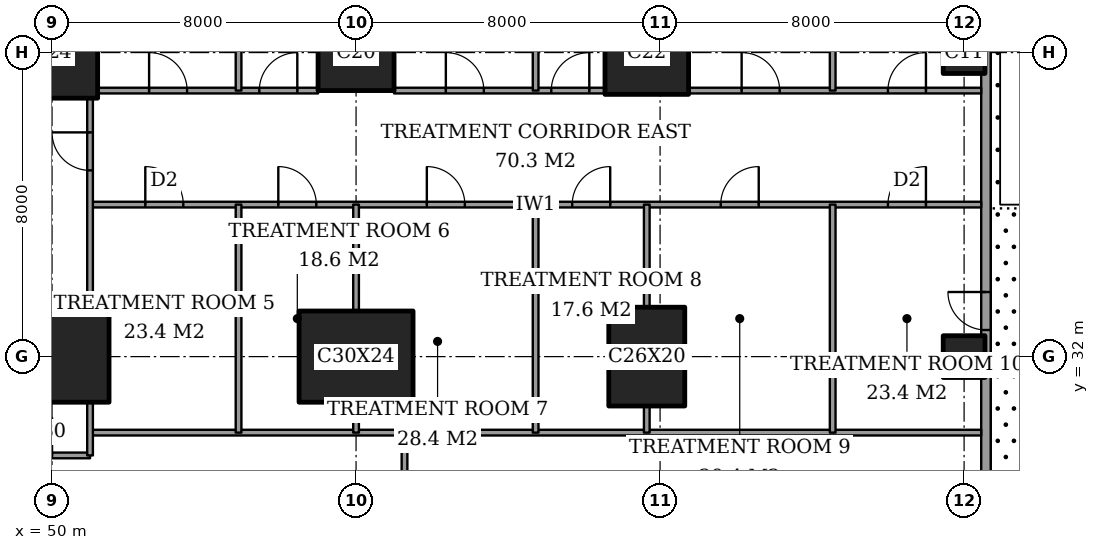
"""IFC4 building model, lengths in metres.
Left out: names, types, materials, properties, quantities, classifications, styles, units other than length and angle.
Written with IfcOpenShell. Run it as: python <this file> out.ifc"""

import sys

from ifc_helpers import new_model, si_unit, direction, frame, frame_2d, origin, origin_2d, place, context, subcontext, project, spatial, rectangle, extrude, element, fill, save


model = new_model("IFC4")
c1 = context("Model", 3, precision=1e-05, world=origin(), true_north=direction((0.0, 1.0)))
c2 = subcontext(c1, "Body", "Model", "MODEL_VIEW")
j1 = project(units=[si_unit("LENGTHUNIT", "METRE"), si_unit("PLANEANGLEUNIT", "RADIAN")], contexts=[c1])
p1 = place(None, origin())
s1 = spatial("IfcSite", under=j1, at=p1, CompositionType="ELEMENT")
p2 = place(p1, origin())
s2 = spatial("IfcBuilding", under=s1, at=p2, CompositionType="ELEMENT")
p3 = place(p2, frame((0.0, 0.0, 11.0)))
s3 = spatial("IfcBuildingStorey", under=s2, at=p3, CompositionType="ELEMENT", Elevation=11.0)
p4 = place(p3, frame((50.0, 32.0, 0.0), z_axis=(0.0, 0.0, 1.0), x_axis=(1.0, 0.0, 0.0)))
e1 = element("IfcColumn", 1, at=p4, inside=s3, PredefinedType="COLUMN", context=c2, shape_type="SweptSolid", body=[
    extrude(rectangle(XDim=3.0, YDim=2.4, at=origin_2d()), origin(), (0.0, 0.0, 1.0), 5.0),
])
p5 = place(p3, frame((50.0, 40.0, 0.0), z_axis=(0.0, 0.0, 1.0), x_axis=(1.0, 0.0, 0.0)))
e2 = element("IfcColumn", 2, at=p5, inside=s3, PredefinedType="COLUMN", context=c2, shape_type="SweptSolid", body=[
    extrude(rectangle(XDim=2.4, YDim=2.4, at=origin_2d()), origin(), (0.0, 0.0, 1.0), 5.0),
])
p6 = place(p3, frame((58.0, 32.0, 0.0), z_axis=(0.0, 0.0, 1.0), x_axis=(1.0, 0.0, 0.0)))
e3 = element("IfcColumn", 3, at=p6, inside=s3, PredefinedType="COLUMN", context=c2, shape_type="SweptSolid", body=[
    extrude(rectangle(XDim=3.0, YDim=2.4, at=origin_2d()), origin(), (0.0, 0.0, 1.0), 5.0),
])
p7 = place(p3, frame((58.0, 40.0, 0.0), z_axis=(0.0, 0.0, 1.0), x_axis=(1.0, 0.0, 0.0)))
e4 = element("IfcColumn", 4, at=p7, inside=s3, PredefinedType="COLUMN", context=c2, shape_type="SweptSolid", body=[
    extrude(rectangle(XDim=2.0, YDim=2.0, at=origin_2d()), origin(), (0.0, 0.0, 1.0), 5.0),
])
p8 = place(p3, frame((65.65, 32.0, 0.0), z_axis=(0.0, 0.0, 1.0), x_axis=(0.0, 1.0, 0.0)))
e5 = element("IfcColumn", 5, at=p8, inside=s3, PredefinedType="COLUMN", context=c2, shape_type="SweptSolid", body=[
    extrude(rectangle(XDim=2.6, YDim=2.0, at=origin_2d()), origin(), (0.0, 0.0, 1.0), 5.0),
])
p9 = place(p3, frame((65.65, 40.0, 0.0), z_axis=(0.0, 0.0, 1.0), x_axis=(1.0, 0.0, 0.0)))
e6 = element("IfcColumn", 6, at=p9, inside=s3, PredefinedType="COLUMN", context=c2, shape_type="SweptSolid", body=[
    extrude(rectangle(XDim=2.2, YDim=2.2, at=origin_2d()), origin(), (0.0, 0.0, 1.0), 5.0),
])
for number, where, z_axis, x_axis in (
    (7, (74.0, 32.0, 0.0), (0.0, 0.0, 1.0), (1.0, 0.0, 0.0)),
    (8, (74.0, 40.0, 0.0), (0.0, 0.0, 1.0), (1.0, 0.0, 0.0)),
):
    element("IfcColumn", number, at=place(p3, frame(where, z_axis=z_axis, x_axis=x_axis)), inside=s3, PredefinedType="COLUMN", context=c2, shape_type="SweptSolid", body=[
        extrude(rectangle(XDim=1.1, YDim=1.1, at=origin_2d()), origin(), (0.0, 0.0, 1.0), 5.0),
    ])
p10 = place(p3, frame((74.575, -8.575, 0.0), z_axis=(0.0, 0.0, 1.0), x_axis=(0.0, 1.0, 0.0)))
e9 = element("IfcWall", 9, at=p10, inside=s3, PredefinedType="SOLIDWALL", context=c2, shape_type="SweptSolid", body=[
    extrude(rectangle(XDim=65.15, YDim=0.25, at=frame_2d((32.575, 0.0))), origin(), (0.0, 0.0, 1.0), 5.0),
])
p11 = place(p10, frame((12.075, 0.0, 0.0)))
e10 = element("IfcOpeningElement", 10, at=p11, cuts=e9, PredefinedType="OPENING", context=c2, shape_type="SweptSolid", body=[
    extrude(rectangle(XDim=1.0, YDim=2.4, at=frame_2d((0.5, 1.2))), frame((0.0, 0.135, 0.0), z_axis=(0.0, -1.0, 0.0), x_axis=(1.0, 0.0, 0.0)), (0.0, 0.0, 1.0), 0.27),
])
p12 = place(p10, frame((28.075, 0.0, 0.0)))
e11 = element("IfcOpeningElement", 11, at=p12, cuts=e9, PredefinedType="OPENING", context=c2, shape_type="SweptSolid", body=[
    extrude(rectangle(XDim=1.0, YDim=2.4, at=frame_2d((0.5, 1.2))), frame((0.0, 0.135, 0.0), z_axis=(0.0, -1.0, 0.0), x_axis=(1.0, 0.0, 0.0)), (0.0, 0.0, 1.0), 0.27),
])
p13 = place(p10, frame((41.275, 0.0, 0.0)))
e12 = element("IfcOpeningElement", 12, at=p13, cuts=e9, PredefinedType="OPENING", context=c2, shape_type="SweptSolid", body=[
    extrude(rectangle(XDim=1.0, YDim=2.4, at=frame_2d((0.5, 1.2))), frame((0.0, 0.135, 0.0), z_axis=(0.0, -1.0, 0.0), x_axis=(1.0, 0.0, 0.0)), (0.0, 0.0, 1.0), 0.27),
])
p14 = place(p3, frame((48.0, 29.4, 0.0), z_axis=(0.0, 0.0, 1.0), x_axis=(1.0, 0.0, 0.0)))
e13 = element("IfcWall", 13, at=p14, inside=s3, PredefinedType="PARTITIONING", context=c2, shape_type="SweptSolid", body=[
    extrude(rectangle(XDim=3.0, YDim=0.15, at=frame_2d((1.5, 0.0))), origin(), (0.0, 0.0, 1.0), 4.7),
])
p15 = place(p14, frame((1.0, 0.0, 0.0)))
e14 = element("IfcOpeningElement", 14, at=p15, cuts=e13, PredefinedType="OPENING", context=c2, shape_type="SweptSolid", body=[
    extrude(rectangle(XDim=1.0, YDim=2.1, at=frame_2d((0.5, 1.05))), frame((0.0, 0.085, 0.0), z_axis=(0.0, -1.0, 0.0), x_axis=(1.0, 0.0, 0.0)), (0.0, 0.0, 1.0), 0.17),
])
p16 = place(p3, frame((51.0, 30.0, 0.0), z_axis=(0.0, 0.0, 1.0), x_axis=(1.0, 0.0, 0.0)))
e15 = element("IfcWall", 15, at=p16, inside=s3, PredefinedType="PARTITIONING", context=c2, shape_type="SweptSolid", body=[
    extrude(rectangle(XDim=23.45, YDim=0.15, at=frame_2d((11.725, 0.0))), origin(), (0.0, 0.0, 1.0), 4.7),
])
p17 = place(p3, frame((51.0, 36.0, 0.0), z_axis=(0.0, 0.0, 1.0), x_axis=(1.0, 0.0, 0.0)))
e16 = element("IfcWall", 16, at=p17, inside=s3, PredefinedType="PARTITIONING", context=c2, shape_type="SweptSolid", body=[
    extrude(rectangle(XDim=23.45, YDim=0.15, at=frame_2d((11.725, 0.0))), origin(), (0.0, 0.0, 1.0), 4.7),
])
p18 = place(p17, frame((1.454, 0.0, 0.0)))
e17 = element("IfcOpeningElement", 17, at=p18, cuts=e16, PredefinedType="OPENING", context=c2, shape_type="SweptSolid", body=[
    extrude(rectangle(XDim=1.0, YDim=2.1, at=frame_2d((0.5, 1.05))), frame((0.0, 0.085, 0.0), z_axis=(0.0, -1.0, 0.0), x_axis=(1.0, 0.0, 0.0)), (0.0, 0.0, 1.0), 0.17),
])
p19 = place(p17, frame((4.954, 0.0, 0.0)))
e18 = element("IfcOpeningElement", 18, at=p19, cuts=e16, PredefinedType="OPENING", context=c2, shape_type="SweptSolid", body=[
    extrude(rectangle(XDim=1.0, YDim=2.1, at=frame_2d((0.5, 1.05))), frame((0.0, 0.085, 0.0), z_axis=(0.0, -1.0, 0.0), x_axis=(1.0, 0.0, 0.0)), (0.0, 0.0, 1.0), 0.17),
])
p20 = place(p17, frame((8.863, 0.0, 0.0)))
e19 = element("IfcOpeningElement", 19, at=p20, cuts=e16, PredefinedType="OPENING", context=c2, shape_type="SweptSolid", body=[
    extrude(rectangle(XDim=1.0, YDim=2.1, at=frame_2d((0.5, 1.05))), frame((0.0, 0.085, 0.0), z_axis=(0.0, -1.0, 0.0), x_axis=(1.0, 0.0, 0.0)), (0.0, 0.0, 1.0), 0.17),
])
p21 = place(p17, frame((12.688, 0.0, 0.0)))
e20 = element("IfcOpeningElement", 20, at=p21, cuts=e16, PredefinedType="OPENING", context=c2, shape_type="SweptSolid", body=[
    extrude(rectangle(XDim=1.0, YDim=2.1, at=frame_2d((0.5, 1.05))), frame((0.0, 0.085, 0.0), z_axis=(0.0, -1.0, 0.0), x_axis=(1.0, 0.0, 0.0)), (0.0, 0.0, 1.0), 0.17),
])
p22 = place(p17, frame((16.596, 0.0, 0.0)))
e21 = element("IfcOpeningElement", 21, at=p22, cuts=e16, PredefinedType="OPENING", context=c2, shape_type="SweptSolid", body=[
    extrude(rectangle(XDim=1.0, YDim=2.1, at=frame_2d((0.5, 1.05))), frame((0.0, 0.085, 0.0), z_axis=(0.0, -1.0, 0.0), x_axis=(1.0, 0.0, 0.0)), (0.0, 0.0, 1.0), 0.17),
])
p23 = place(p17, frame((20.996, 0.0, 0.0)))
e22 = element("IfcOpeningElement", 22, at=p23, cuts=e16, PredefinedType="OPENING", context=c2, shape_type="SweptSolid", body=[
    extrude(rectangle(XDim=1.0, YDim=2.1, at=frame_2d((0.5, 1.05))), frame((0.0, 0.085, 0.0), z_axis=(0.0, -1.0, 0.0), x_axis=(1.0, 0.0, 0.0)), (0.0, 0.0, 1.0), 0.17),
])
p24 = place(p3, frame((51.2, 39.0, 0.0), z_axis=(0.0, 0.0, 1.0), x_axis=(1.0, 0.0, 0.0)))
e23 = element("IfcWall", 23, at=p24, inside=s3, PredefinedType="PARTITIONING", context=c2, shape_type="SweptSolid", body=[
    extrude(rectangle(XDim=5.8, YDim=0.15, at=frame_2d((2.9, 0.0))), origin(), (0.0, 0.0, 1.0), 4.7),
])
p25 = place(p24, frame((1.354, 0.0, 0.0)))
e24 = element("IfcOpeningElement", 24, at=p25, cuts=e23, PredefinedType="OPENING", context=c2, shape_type="SweptSolid", body=[
    extrude(rectangle(XDim=1.0, YDim=2.1, at=frame_2d((0.5, 1.05))), frame((0.0, 0.085, 0.0), z_axis=(0.0, -1.0, 0.0), x_axis=(1.0, 0.0, 0.0)), (0.0, 0.0, 1.0), 0.17),
])
p26 = place(p24, frame((4.254, 0.0, 0.0)))
e25 = element("IfcOpeningElement", 25, at=p26, cuts=e23, PredefinedType="OPENING", context=c2, shape_type="SweptSolid", body=[
    extrude(rectangle(XDim=1.0, YDim=2.1, at=frame_2d((0.5, 1.05))), frame((0.0, 0.085, 0.0), z_axis=(0.0, -1.0, 0.0), x_axis=(1.0, 0.0, 0.0)), (0.0, 0.0, 1.0), 0.17),
])
p27 = place(p3, frame((59.0, 39.0, 0.0), z_axis=(0.0, 0.0, 1.0), x_axis=(1.0, 0.0, 0.0)))
e26 = element("IfcWall", 26, at=p27, inside=s3, PredefinedType="PARTITIONING", context=c2, shape_type="SweptSolid", body=[
    extrude(rectangle(XDim=5.55, YDim=0.15, at=frame_2d((2.775, 0.0))), origin(), (0.0, 0.0, 1.0), 4.7),
])
p28 = place(p27, frame((1.363, 0.0, 0.0)))
e27 = element("IfcOpeningElement", 27, at=p28, cuts=e26, PredefinedType="OPENING", context=c2, shape_type="SweptSolid", body=[
    extrude(rectangle(XDim=1.0, YDim=2.1, at=frame_2d((0.5, 1.05))), frame((0.0, 0.085, 0.0), z_axis=(0.0, -1.0, 0.0), x_axis=(1.0, 0.0, 0.0)), (0.0, 0.0, 1.0), 0.17),
])
p29 = place(p27, frame((4.137, 0.0, 0.0)))
e28 = element("IfcOpeningElement", 28, at=p29, cuts=e26, PredefinedType="OPENING", context=c2, shape_type="SweptSolid", body=[
    extrude(rectangle(XDim=1.0, YDim=2.1, at=frame_2d((0.5, 1.05))), frame((0.0, 0.085, 0.0), z_axis=(0.0, -1.0, 0.0), x_axis=(1.0, 0.0, 0.0)), (0.0, 0.0, 1.0), 0.17),
])
p30 = place(p3, frame((66.75, 39.0, 0.0), z_axis=(0.0, 0.0, 1.0), x_axis=(1.0, 0.0, 0.0)))
e29 = element("IfcWall", 29, at=p30, inside=s3, PredefinedType="PARTITIONING", context=c2, shape_type="SweptSolid", body=[
    extrude(rectangle(XDim=7.7, YDim=0.15, at=frame_2d((3.85, 0.0))), origin(), (0.0, 0.0, 1.0), 4.7),
])
p31 = place(p30, frame((1.396, 0.0, 0.0)))
e30 = element("IfcOpeningElement", 30, at=p31, cuts=e29, PredefinedType="OPENING", context=c2, shape_type="SweptSolid", body=[
    extrude(rectangle(XDim=1.0, YDim=2.1, at=frame_2d((0.5, 1.05))), frame((0.0, 0.085, 0.0), z_axis=(0.0, -1.0, 0.0), x_axis=(1.0, 0.0, 0.0)), (0.0, 0.0, 1.0), 0.17),
])
p32 = place(p30, frame((5.246, 0.0, 0.0)))
e31 = element("IfcOpeningElement", 31, at=p32, cuts=e29, PredefinedType="OPENING", context=c2, shape_type="SweptSolid", body=[
    extrude(rectangle(XDim=1.0, YDim=2.1, at=frame_2d((0.5, 1.05))), frame((0.0, 0.085, 0.0), z_axis=(0.0, -1.0, 0.0), x_axis=(1.0, 0.0, 0.0)), (0.0, 0.0, 1.0), 0.17),
])
p33 = place(p3, frame((51.0, 29.4, 0.0), z_axis=(0.0, 0.0, 1.0), x_axis=(0.0, 1.0, 0.0)))
e32 = element("IfcWall", 32, at=p33, inside=s3, PredefinedType="PARTITIONING", context=c2, shape_type="SweptSolid", body=[
    extrude(rectangle(XDim=1.4, YDim=0.15, at=frame_2d((0.7, 0.0))), origin(), (0.0, 0.0, 1.0), 4.7),
])
p34 = place(p3, frame((51.0, 33.2, 0.0), z_axis=(0.0, 0.0, 1.0), x_axis=(0.0, 1.0, 0.0)))
e33 = element("IfcWall", 33, at=p34, inside=s3, PredefinedType="PARTITIONING", context=c2, shape_type="SweptSolid", body=[
    extrude(rectangle(XDim=5.6, YDim=0.15, at=frame_2d((2.8, 0.0))), origin(), (0.0, 0.0, 1.0), 4.7),
])
p35 = place(p34, frame((3.7, 0.0, 0.0)))
e34 = element("IfcOpeningElement", 34, at=p35, cuts=e33, PredefinedType="OPENING", context=c2, shape_type="SweptSolid", body=[
    extrude(rectangle(XDim=1.0, YDim=2.1, at=frame_2d((0.5, 1.05))), frame((0.0, 0.085, 0.0), z_axis=(0.0, -1.0, 0.0), x_axis=(1.0, 0.0, 0.0)), (0.0, 0.0, 1.0), 0.17),
])
p36 = place(p3, frame((54.908, 30.0, 0.0), z_axis=(0.0, 0.0, 1.0), x_axis=(0.0, 1.0, 0.0)))
e35 = element("IfcWall", 35, at=p36, inside=s3, PredefinedType="PARTITIONING", context=c2, shape_type="SweptSolid", body=[
    extrude(rectangle(XDim=6.0, YDim=0.15, at=frame_2d((3.0, 0.0))), origin(), (0.0, 0.0, 1.0), 4.7),
])
p37 = place(p3, frame((54.908, 39.0, 0.0), z_axis=(0.0, 0.0, 1.0), x_axis=(0.0, 1.0, 0.0)))
e36 = element("IfcWall", 36, at=p37, inside=s3, PredefinedType="PARTITIONING", context=c2, shape_type="SweptSolid", body=[
    extrude(rectangle(XDim=5.0, YDim=0.15, at=frame_2d((2.5, 0.0))), origin(), (0.0, 0.0, 1.0), 4.7),
])
p38 = place(p3, frame((58.0, 30.0, 0.0), z_axis=(0.0, 0.0, 1.0), x_axis=(0.0, 1.0, 0.0)))
e37 = element("IfcWall", 37, at=p38, inside=s3, PredefinedType="PARTITIONING", context=c2, shape_type="SweptSolid", body=[
    extrude(rectangle(XDim=0.8, YDim=0.15, at=frame_2d((0.4, 0.0))), origin(), (0.0, 0.0, 1.0), 3.3),
])
p39 = place(p3, frame((58.0, 33.2, 0.0), z_axis=(0.0, 0.0, 1.0), x_axis=(0.0, 1.0, 0.0)))
e38 = element("IfcWall", 38, at=p39, inside=s3, PredefinedType="PARTITIONING", context=c2, shape_type="SweptSolid", body=[
    extrude(rectangle(XDim=2.8, YDim=0.15, at=frame_2d((1.4, 0.0))), origin(), (0.0, 0.0, 1.0), 3.3),
])
p40 = place(p3, frame((59.275, 28.35, 0.0), z_axis=(0.0, 0.0, 1.0), x_axis=(0.0, 1.0, 0.0)))
e39 = element("IfcWall", 39, at=p40, inside=s3, PredefinedType="PARTITIONING", context=c2, shape_type="SweptSolid", body=[
    extrude(rectangle(XDim=1.65, YDim=0.15, at=frame_2d((0.825, 0.0))), origin(), (0.0, 0.0, 1.0), 4.7),
])
p41 = place(p3, frame((62.725, 30.0, 0.0), z_axis=(0.0, 0.0, 1.0), x_axis=(0.0, 1.0, 0.0)))
e40 = element("IfcWall", 40, at=p41, inside=s3, PredefinedType="PARTITIONING", context=c2, shape_type="SweptSolid", body=[
    extrude(rectangle(XDim=6.0, YDim=0.15, at=frame_2d((3.0, 0.0))), origin(), (0.0, 0.0, 1.0), 4.7),
])
p42 = place(p3, frame((62.725, 39.0, 0.0), z_axis=(0.0, 0.0, 1.0), x_axis=(0.0, 1.0, 0.0)))
e41 = element("IfcWall", 41, at=p42, inside=s3, PredefinedType="PARTITIONING", context=c2, shape_type="SweptSolid", body=[
    extrude(rectangle(XDim=5.0, YDim=0.15, at=frame_2d((2.5, 0.0))), origin(), (0.0, 0.0, 1.0), 4.7),
])
p43 = place(p3, frame((65.65, 30.0, 0.0), z_axis=(0.0, 0.0, 1.0), x_axis=(0.0, 1.0, 0.0)))
e42 = element("IfcWall", 42, at=p43, inside=s3, PredefinedType="PARTITIONING", context=c2, shape_type="SweptSolid", body=[
    extrude(rectangle(XDim=1.0, YDim=0.15, at=frame_2d((0.5, 0.0))), origin(), (0.0, 0.0, 1.0), 3.3),
])
p44 = place(p3, frame((65.65, 33.0, 0.0), z_axis=(0.0, 0.0, 1.0), x_axis=(0.0, 1.0, 0.0)))
e43 = element("IfcWall", 43, at=p44, inside=s3, PredefinedType="PARTITIONING", context=c2, shape_type="SweptSolid", body=[
    extrude(rectangle(XDim=3.0, YDim=0.15, at=frame_2d((1.5, 0.0))), origin(), (0.0, 0.0, 1.0), 3.3),
])
p45 = place(p3, frame((70.542, 30.0, 0.0), z_axis=(0.0, 0.0, 1.0), x_axis=(0.0, 1.0, 0.0)))
e44 = element("IfcWall", 44, at=p45, inside=s3, PredefinedType="PARTITIONING", context=c2, shape_type="SweptSolid", body=[
    extrude(rectangle(XDim=6.0, YDim=0.15, at=frame_2d((3.0, 0.0))), origin(), (0.0, 0.0, 1.0), 4.7),
])
p46 = place(p3, frame((70.542, 39.0, 0.0), z_axis=(0.0, 0.0, 1.0), x_axis=(0.0, 1.0, 0.0)))
e45 = element("IfcWall", 45, at=p46, inside=s3, PredefinedType="PARTITIONING", context=c2, shape_type="SweptSolid", body=[
    extrude(rectangle(XDim=5.0, YDim=0.15, at=frame_2d((2.5, 0.0))), origin(), (0.0, 0.0, 1.0), 4.7),
])
p47 = place(p13, origin())
e46 = element("IfcDoor", 46, at=p47, inside=s3, OperationType="SINGLE_SWING_LEFT", PredefinedType="DOOR", context=c2, shape_type="SweptSolid", body=[
    extrude(rectangle(XDim=1.0, YDim=2.4, at=frame_2d((0.5, 1.2))), frame((0.0, 0.025, 0.0), z_axis=(0.0, -1.0, 0.0), x_axis=(1.0, 0.0, 0.0)), (0.0, 0.0, 1.0), 0.05),
])
fill(e12, e46)
p48 = place(p35, origin())
e47 = element("IfcDoor", 47, at=p48, inside=s3, OperationType="SINGLE_SWING_LEFT", PredefinedType="DOOR", context=c2, shape_type="SweptSolid", body=[
    extrude(rectangle(XDim=1.0, YDim=2.1, at=frame_2d((0.5, 1.05))), frame((0.0, 0.025, 0.0), z_axis=(0.0, -1.0, 0.0), x_axis=(1.0, 0.0, 0.0)), (0.0, 0.0, 1.0), 0.05),
])
fill(e34, e47)
p49 = place(p18, origin())
e48 = element("IfcDoor", 48, at=p49, inside=s3, OperationType="SINGLE_SWING_RIGHT", PredefinedType="DOOR", context=c2, shape_type="SweptSolid", body=[
    extrude(rectangle(XDim=1.0, YDim=2.1, at=frame_2d((0.5, 1.05))), frame((0.0, 0.025, 0.0), z_axis=(0.0, -1.0, 0.0), x_axis=(1.0, 0.0, 0.0)), (0.0, 0.0, 1.0), 0.05),
])
fill(e17, e48)
p50 = place(p19, origin())
e49 = element("IfcDoor", 49, at=p50, inside=s3, OperationType="SINGLE_SWING_RIGHT", PredefinedType="DOOR", context=c2, shape_type="SweptSolid", body=[
    extrude(rectangle(XDim=1.0, YDim=2.1, at=frame_2d((0.5, 1.05))), frame((0.0, 0.025, 0.0), z_axis=(0.0, -1.0, 0.0), x_axis=(1.0, 0.0, 0.0)), (0.0, 0.0, 1.0), 0.05),
])
fill(e18, e49)
p51 = place(p20, origin())
e50 = element("IfcDoor", 50, at=p51, inside=s3, OperationType="SINGLE_SWING_RIGHT", PredefinedType="DOOR", context=c2, shape_type="SweptSolid", body=[
    extrude(rectangle(XDim=1.0, YDim=2.1, at=frame_2d((0.5, 1.05))), frame((0.0, 0.025, 0.0), z_axis=(0.0, -1.0, 0.0), x_axis=(1.0, 0.0, 0.0)), (0.0, 0.0, 1.0), 0.05),
])
fill(e19, e50)
p52 = place(p21, origin())
e51 = element("IfcDoor", 51, at=p52, inside=s3, OperationType="SINGLE_SWING_LEFT", PredefinedType="DOOR", context=c2, shape_type="SweptSolid", body=[
    extrude(rectangle(XDim=1.0, YDim=2.1, at=frame_2d((0.5, 1.05))), frame((0.0, 0.025, 0.0), z_axis=(0.0, -1.0, 0.0), x_axis=(1.0, 0.0, 0.0)), (0.0, 0.0, 1.0), 0.05),
])
fill(e20, e51)
p53 = place(p22, origin())
e52 = element("IfcDoor", 52, at=p53, inside=s3, OperationType="SINGLE_SWING_LEFT", PredefinedType="DOOR", context=c2, shape_type="SweptSolid", body=[
    extrude(rectangle(XDim=1.0, YDim=2.1, at=frame_2d((0.5, 1.05))), frame((0.0, 0.025, 0.0), z_axis=(0.0, -1.0, 0.0), x_axis=(1.0, 0.0, 0.0)), (0.0, 0.0, 1.0), 0.05),
])
fill(e21, e52)
p54 = place(p23, origin())
e53 = element("IfcDoor", 53, at=p54, inside=s3, OperationType="SINGLE_SWING_LEFT", PredefinedType="DOOR", context=c2, shape_type="SweptSolid", body=[
    extrude(rectangle(XDim=1.0, YDim=2.1, at=frame_2d((0.5, 1.05))), frame((0.0, 0.025, 0.0), z_axis=(0.0, -1.0, 0.0), x_axis=(1.0, 0.0, 0.0)), (0.0, 0.0, 1.0), 0.05),
])
fill(e22, e53)
p55 = place(p25, origin())
e54 = element("IfcDoor", 54, at=p55, inside=s3, OperationType="SINGLE_SWING_RIGHT", PredefinedType="DOOR", context=c2, shape_type="SweptSolid", body=[
    extrude(rectangle(XDim=1.0, YDim=2.1, at=frame_2d((0.5, 1.05))), frame((0.0, 0.025, 0.0), z_axis=(0.0, -1.0, 0.0), x_axis=(1.0, 0.0, 0.0)), (0.0, 0.0, 1.0), 0.05),
])
fill(e24, e54)
p56 = place(p26, origin())
e55 = element("IfcDoor", 55, at=p56, inside=s3, OperationType="SINGLE_SWING_LEFT", PredefinedType="DOOR", context=c2, shape_type="SweptSolid", body=[
    extrude(rectangle(XDim=1.0, YDim=2.1, at=frame_2d((0.5, 1.05))), frame((0.0, 0.025, 0.0), z_axis=(0.0, -1.0, 0.0), x_axis=(1.0, 0.0, 0.0)), (0.0, 0.0, 1.0), 0.05),
])
fill(e25, e55)
p57 = place(p28, origin())
e56 = element("IfcDoor", 56, at=p57, inside=s3, OperationType="SINGLE_SWING_RIGHT", PredefinedType="DOOR", context=c2, shape_type="SweptSolid", body=[
    extrude(rectangle(XDim=1.0, YDim=2.1, at=frame_2d((0.5, 1.05))), frame((0.0, 0.025, 0.0), z_axis=(0.0, -1.0, 0.0), x_axis=(1.0, 0.0, 0.0)), (0.0, 0.0, 1.0), 0.05),
])
fill(e27, e56)
p58 = place(p29, origin())
e57 = element("IfcDoor", 57, at=p58, inside=s3, OperationType="SINGLE_SWING_LEFT", PredefinedType="DOOR", context=c2, shape_type="SweptSolid", body=[
    extrude(rectangle(XDim=1.0, YDim=2.1, at=frame_2d((0.5, 1.05))), frame((0.0, 0.025, 0.0), z_axis=(0.0, -1.0, 0.0), x_axis=(1.0, 0.0, 0.0)), (0.0, 0.0, 1.0), 0.05),
])
fill(e28, e57)
p59 = place(p31, origin())
e58 = element("IfcDoor", 58, at=p59, inside=s3, OperationType="SINGLE_SWING_RIGHT", PredefinedType="DOOR", context=c2, shape_type="SweptSolid", body=[
    extrude(rectangle(XDim=1.0, YDim=2.1, at=frame_2d((0.5, 1.05))), frame((0.0, 0.025, 0.0), z_axis=(0.0, -1.0, 0.0), x_axis=(1.0, 0.0, 0.0)), (0.0, 0.0, 1.0), 0.05),
])
fill(e30, e58)
p60 = place(p32, origin())
e59 = element("IfcDoor", 59, at=p60, inside=s3, OperationType="SINGLE_SWING_LEFT", PredefinedType="DOOR", context=c2, shape_type="SweptSolid", body=[
    extrude(rectangle(XDim=1.0, YDim=2.1, at=frame_2d((0.5, 1.05))), frame((0.0, 0.025, 0.0), z_axis=(0.0, -1.0, 0.0), x_axis=(1.0, 0.0, 0.0)), (0.0, 0.0, 1.0), 0.05),
])
fill(e31, e59)
save(model, sys.argv[1])
